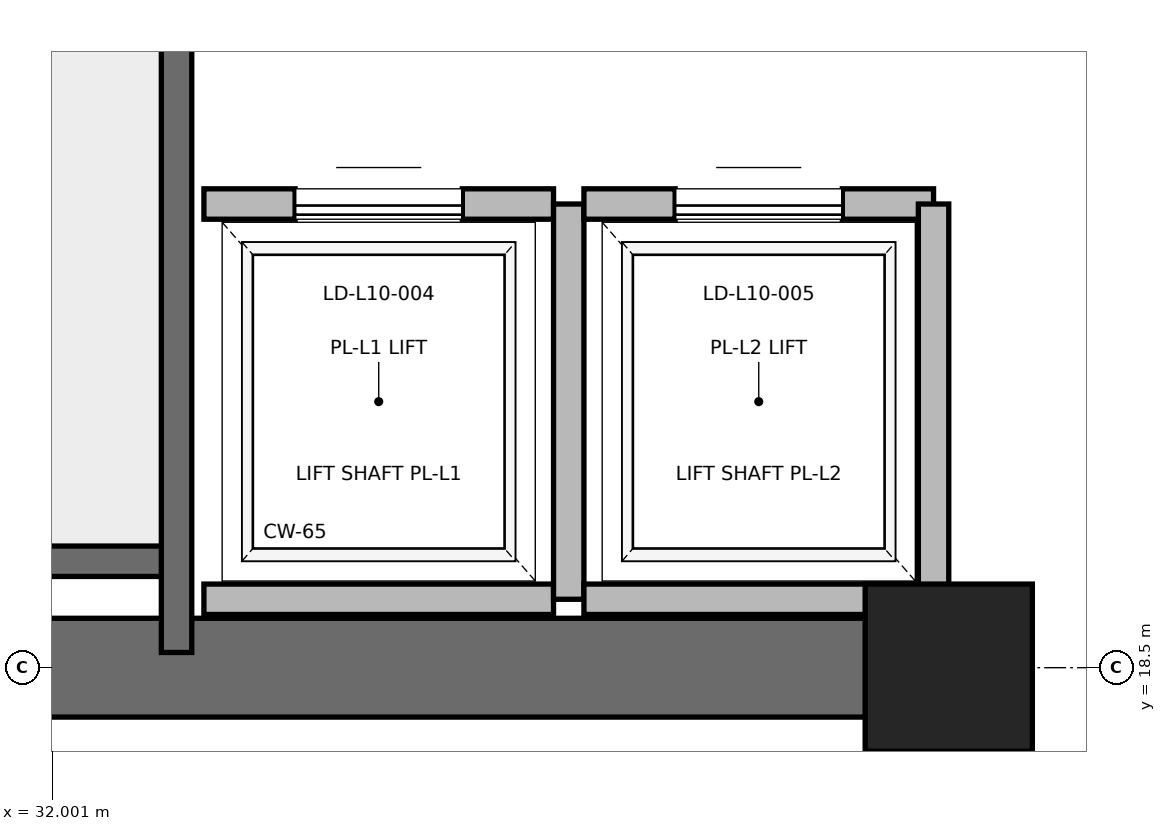
"""IFC4 building model, lengths in metres.
Left out: names, types, materials, properties, quantities, classifications, styles, units other than length and angle.
Written with IfcOpenShell. Run it as: python <this file> out.ifc"""

import sys

from ifc_helpers import new_model, si_unit, direction, frame, frame_2d, origin, origin_2d, place, context, subcontext, project, spatial, rectangle, extrude, element, fill, save


model = new_model("IFC4")
c1 = context("Model", 3, precision=1e-05, world=origin(), true_north=direction((0.0, 1.0)))
c2 = subcontext(c1, "Body", "Model", "MODEL_VIEW")
j1 = project(units=[si_unit("LENGTHUNIT", "METRE"), si_unit("PLANEANGLEUNIT", "RADIAN")], contexts=[c1])
p1 = place(None, origin())
s1 = spatial("IfcSite", under=j1, at=p1, CompositionType="ELEMENT")
p2 = place(p1, origin())
s2 = spatial("IfcBuilding", under=s1, at=p2, CompositionType="ELEMENT")
p3 = place(p2, frame((0.0, 0.0, 47.6)))
s3 = spatial("IfcBuildingStorey", under=s2, at=p3, CompositionType="ELEMENT", Elevation=47.6)
p4 = place(p3, frame((37.9, 18.5, 0.0), z_axis=(0.0, 0.0, 1.0), x_axis=(1.0, 0.0, 0.0)))
e1 = element("IfcColumn", 1, at=p4, inside=s3, PredefinedType="PILASTER", context=c2, shape_type="SweptSolid", body=[
    extrude(rectangle(XDim=1.1, YDim=1.1, at=origin_2d()), origin(), (0.0, 0.0, 1.0), 4.0),
])
p5 = place(p3, frame((29.0, 18.5, 0.0), z_axis=(0.0, 0.0, 1.0), x_axis=(1.0, 0.0, 0.0)))
e2 = element("IfcWall", 2, at=p5, inside=s3, PredefinedType="SHEAR", context=c2, shape_type="SweptSolid", body=[
    extrude(rectangle(XDim=9.2, YDim=0.65, at=frame_2d((4.6, 0.0))), origin(), (0.0, 0.0, 1.0), 3.76),
])
p6 = place(p3, frame((29.7, 19.2, 0.0), z_axis=(0.0, 0.0, 1.0), x_axis=(1.0, 0.0, 0.0)))
e3 = element("IfcWall", 3, at=p6, inside=s3, PredefinedType="SOLIDWALL", context=c2, shape_type="SweptSolid", body=[
    extrude(rectangle(XDim=3.12, YDim=0.2, at=frame_2d((1.56, 0.0))), origin(), (0.0, 0.0, 1.0), 3.76),
])
p7 = place(p3, frame((32.82, 18.6, 0.0), z_axis=(0.0, 0.0, 1.0), x_axis=(0.0, 1.0, 0.0)))
e4 = element("IfcWall", 4, at=p7, inside=s3, PredefinedType="SOLIDWALL", context=c2, shape_type="SweptSolid", body=[
    extrude(rectangle(XDim=8.78, YDim=0.2, at=frame_2d((4.39, 0.0))), origin(), (0.0, 0.0, 1.0), 3.76),
])
p8 = place(p3, frame((33.0, 18.95, 0.0), z_axis=(0.0, 0.0, 1.0), x_axis=(1.0, 0.0, 0.0)))
e5 = element("IfcWall", 5, at=p8, inside=s3, PredefinedType="SOLIDWALL", context=c2, shape_type="SweptSolid", body=[
    extrude(rectangle(XDim=2.3, YDim=0.2, at=frame_2d((1.15, 0.0))), origin(), (0.0, 0.0, 1.0), 3.76),
])
p9 = place(p3, frame((35.3, 21.55, 0.0), z_axis=(0.0, 0.0, 1.0), x_axis=(-1.0, 0.0, 0.0)))
e6 = element("IfcWall", 6, at=p9, inside=s3, PredefinedType="SOLIDWALL", context=c2, shape_type="SweptSolid", body=[
    extrude(rectangle(XDim=2.3, YDim=0.2, at=frame_2d((1.15, 0.0))), origin(), (0.0, 0.0, 1.0), 3.76),
])
p10 = place(p9, frame((0.6, 0.0, 0.0)))
e7 = element("IfcOpeningElement", 7, at=p10, cuts=e6, PredefinedType="OPENING", context=c2, shape_type="SweptSolid", body=[
    extrude(rectangle(XDim=1.1, YDim=2.2, at=frame_2d((0.55, 1.1))), frame((0.0, 0.1, 0.0), z_axis=(0.0, -1.0, 0.0), x_axis=(1.0, 0.0, 0.0)), (0.0, 0.0, 1.0), 0.2),
])
p11 = place(p3, frame((35.4, 18.95, 0.0), z_axis=(0.0, 0.0, 1.0), x_axis=(0.0, 1.0, 0.0)))
e8 = element("IfcWall", 8, at=p11, inside=s3, PredefinedType="SOLIDWALL", context=c2, shape_type="SweptSolid", body=[
    extrude(rectangle(XDim=2.6, YDim=0.2, at=frame_2d((1.3, 0.0))), origin(), (0.0, 0.0, 1.0), 3.76),
])
p12 = place(p3, frame((35.5, 18.95, 0.0), z_axis=(0.0, 0.0, 1.0), x_axis=(1.0, 0.0, 0.0)))
e9 = element("IfcWall", 9, at=p12, inside=s3, PredefinedType="SOLIDWALL", context=c2, shape_type="SweptSolid", body=[
    extrude(rectangle(XDim=2.3, YDim=0.2, at=frame_2d((1.15, 0.0))), origin(), (0.0, 0.0, 1.0), 2.54),
])
p13 = place(p3, frame((37.8, 21.55, 0.0), z_axis=(0.0, 0.0, 1.0), x_axis=(-1.0, 0.0, 0.0)))
e10 = element("IfcWall", 10, at=p13, inside=s3, PredefinedType="SOLIDWALL", context=c2, shape_type="SweptSolid", body=[
    extrude(rectangle(XDim=2.3, YDim=0.2, at=frame_2d((1.15, 0.0))), origin(), (0.0, 0.0, 1.0), 3.76),
])
p14 = place(p13, frame((0.6, 0.0, 0.0)))
e11 = element("IfcOpeningElement", 11, at=p14, cuts=e10, PredefinedType="OPENING", context=c2, shape_type="SweptSolid", body=[
    extrude(rectangle(XDim=1.1, YDim=2.2, at=frame_2d((0.55, 1.1))), frame((0.0, 0.1, 0.0), z_axis=(0.0, -1.0, 0.0), x_axis=(1.0, 0.0, 0.0)), (0.0, 0.0, 1.0), 0.2),
])
p15 = place(p3, frame((37.8, 18.95, 0.0), z_axis=(0.0, 0.0, 1.0), x_axis=(0.0, 1.0, 0.0)))
e12 = element("IfcWall", 12, at=p15, inside=s3, PredefinedType="SOLIDWALL", context=c2, shape_type="SweptSolid", body=[
    extrude(rectangle(XDim=2.6, YDim=0.2, at=frame_2d((1.3, 0.0))), origin(), (0.0, 0.0, 1.0), 2.54),
])
p16 = place(p10, origin())
e13 = element("IfcDoor", 13, at=p16, inside=s3, OperationType="SLIDING_TO_RIGHT", PredefinedType="DOOR", context=c2, shape_type="SweptSolid", body=[
    extrude(rectangle(XDim=1.1, YDim=2.2, at=frame_2d((0.55, 1.1))), frame((0.0, 0.025, 0.0), z_axis=(0.0, -1.0, 0.0), x_axis=(1.0, 0.0, 0.0)), (0.0, 0.0, 1.0), 0.05),
])
fill(e7, e13)
p17 = place(p14, origin())
e14 = element("IfcDoor", 14, at=p17, inside=s3, OperationType="SLIDING_TO_RIGHT", PredefinedType="DOOR", context=c2, shape_type="SweptSolid", body=[
    extrude(rectangle(XDim=1.1, YDim=2.2, at=frame_2d((0.55, 1.1))), frame((0.0, 0.025, 0.0), z_axis=(0.0, -1.0, 0.0), x_axis=(1.0, 0.0, 0.0)), (0.0, 0.0, 1.0), 0.05),
])
fill(e11, e14)
save(model, sys.argv[1])
